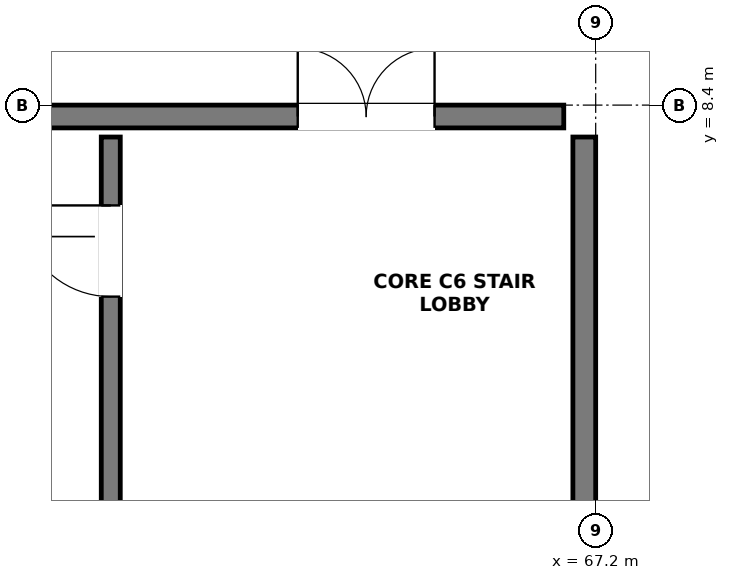
"""IFC4 building model, lengths in metres.
Left out: names, types, materials, properties, quantities, classifications, styles, units other than length and angle.
Written with IfcOpenShell. Run it as: python <this file> out.ifc"""

import sys

from ifc_helpers import new_model, si_unit, direction, frame, frame_2d, origin, place, context, subcontext, project, spatial, rectangle, extrude, element, fill, save


model = new_model("IFC4")
c1 = context("Model", 3, precision=1e-05, world=origin(), true_north=direction((0.0, 1.0)))
c2 = subcontext(c1, "Body", "Model", "MODEL_VIEW")
j1 = project(units=[si_unit("LENGTHUNIT", "METRE"), si_unit("PLANEANGLEUNIT", "RADIAN")], contexts=[c1])
p1 = place(None, origin())
s1 = spatial("IfcSite", under=j1, at=p1, CompositionType="ELEMENT")
p2 = place(p1, origin())
s2 = spatial("IfcBuilding", under=s1, at=p2, CompositionType="ELEMENT")
p3 = place(p2, frame((0.0, 0.0, 5.1)))
s3 = spatial("IfcBuildingStorey", under=s2, at=p3, CompositionType="ELEMENT", Elevation=5.1)
p4 = place(p3, frame((50.82, 8.25, 0.0), z_axis=(0.0, 0.0, 1.0), x_axis=(1.0, 0.0, 0.0)))
e1 = element("IfcWall", 1, at=p4, inside=s3, PredefinedType="SHEAR", context=c2, shape_type="SweptSolid", body=[
    extrude(rectangle(XDim=15.96, YDim=0.3, at=frame_2d((7.98, 0.0))), origin(), (0.0, 0.0, 1.0), 4.53),
])
p5 = place(p4, frame((12.46, 0.0, 0.0)))
e2 = element("IfcOpeningElement", 2, at=p5, cuts=e1, PredefinedType="OPENING", context=c2, shape_type="SweptSolid", body=[
    extrude(rectangle(XDim=1.8, YDim=2.2, at=frame_2d((0.9, 1.1))), frame((0.0, 0.162, 0.0), z_axis=(0.0, -1.0, 0.0), x_axis=(1.0, 0.0, 0.0)), (0.0, 0.0, 1.0), 0.324),
])
p6 = place(p3, frame((67.05, 0.42, 0.0), z_axis=(0.0, 0.0, 1.0), x_axis=(0.0, 1.0, 0.0)))
e3 = element("IfcWall", 3, at=p6, inside=s3, PredefinedType="SHEAR", context=c2, shape_type="SweptSolid", body=[
    extrude(rectangle(XDim=7.56, YDim=0.3, at=frame_2d((3.78, 0.0))), origin(), (0.0, 0.0, 1.0), 4.53),
])
p7 = place(p3, frame((60.82, 0.42, 0.0), z_axis=(0.0, 0.0, 1.0), x_axis=(0.0, 1.0, 0.0)))
e4 = element("IfcWall", 4, at=p7, inside=s3, PredefinedType="SHEAR", context=c2, shape_type="SweptSolid", body=[
    extrude(rectangle(XDim=7.56, YDim=0.25, at=frame_2d((3.78, 0.0))), origin(), (0.0, 0.0, 1.0), 4.53),
])
p8 = place(p7, frame((5.46, 0.0, 0.0)))
e5 = element("IfcOpeningElement", 5, at=p8, cuts=e4, PredefinedType="OPENING", context=c2, shape_type="SweptSolid", body=[
    extrude(rectangle(XDim=1.2, YDim=2.2, at=frame_2d((0.6, 1.1))), frame((0.0, 0.137, 0.0), z_axis=(0.0, -1.0, 0.0), x_axis=(1.0, 0.0, 0.0)), (0.0, 0.0, 1.0), 0.274),
])
p9 = place(p5, origin())
e6 = element("IfcDoor", 6, at=p9, inside=s3, OperationType="DOUBLE_DOOR_SINGLE_SWING", PredefinedType="DOOR", context=c2, shape_type="SweptSolid", body=[
    extrude(rectangle(XDim=1.8, YDim=2.2, at=frame_2d((0.9, 1.1))), frame((0.0, 0.025, 0.0), z_axis=(0.0, -1.0, 0.0), x_axis=(1.0, 0.0, 0.0)), (0.0, 0.0, 1.0), 0.05),
])
fill(e2, e6)
p10 = place(p8, origin())
e7 = element("IfcDoor", 7, at=p10, inside=s3, OperationType="SINGLE_SWING_RIGHT", PredefinedType="DOOR", context=c2, shape_type="SweptSolid", body=[
    extrude(rectangle(XDim=1.2, YDim=2.2, at=frame_2d((0.6, 1.1))), frame((0.0, 0.025, 0.0), z_axis=(0.0, -1.0, 0.0), x_axis=(1.0, 0.0, 0.0)), (0.0, 0.0, 1.0), 0.05),
])
fill(e5, e7)
save(model, sys.argv[1])
